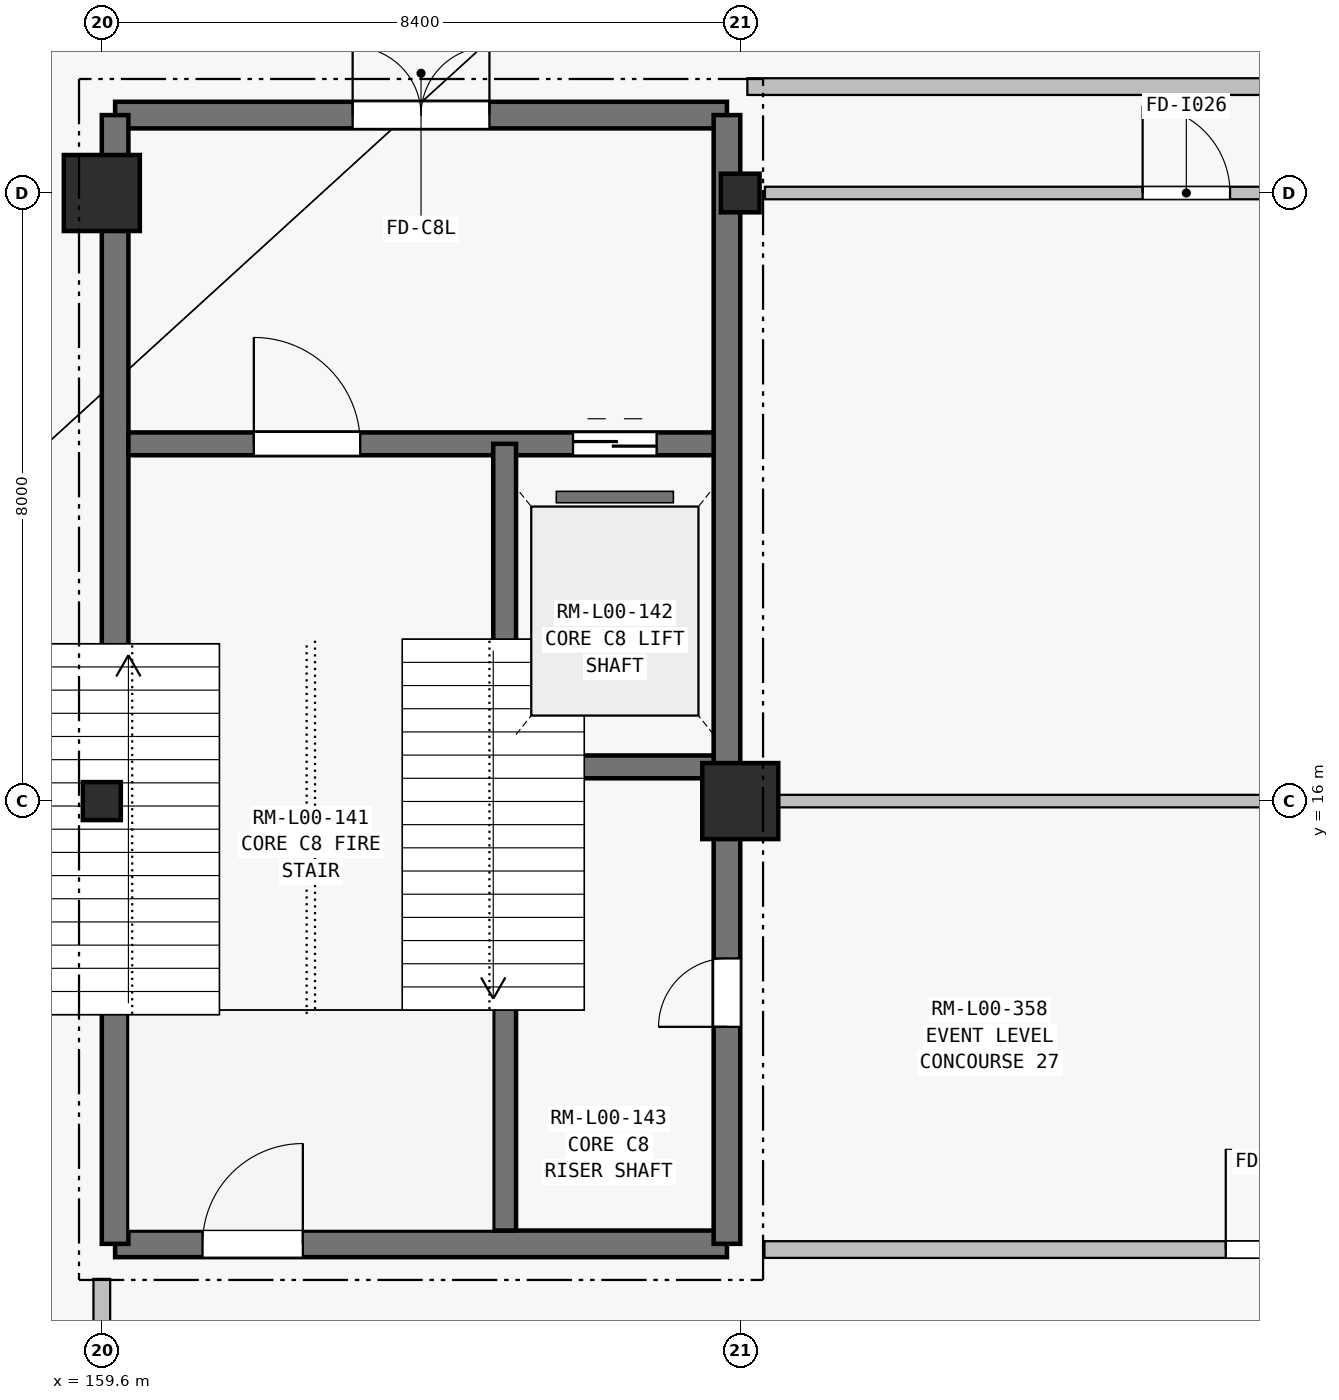
"""IFC4 building model, lengths in metres.
Left out: names, types, materials, properties, quantities, classifications, styles, units other than length and angle.
Written with IfcOpenShell. Run it as: python <this file> out.ifc"""

import sys

from ifc_helpers import new_model, si_unit, direction, frame, frame_2d, origin, origin_2d, place, context, subcontext, project, spatial, rectangle, hollow_circle, i_section, extrude, element, fill, save


model = new_model("IFC4")
c1 = context("Model", 3, precision=1e-05, world=origin(), true_north=direction((0.0, 1.0)))
c2 = subcontext(c1, "Body", "Model", "MODEL_VIEW")
j1 = project(units=[si_unit("LENGTHUNIT", "METRE"), si_unit("PLANEANGLEUNIT", "RADIAN")], contexts=[c1])
p1 = place(None, origin())
s1 = spatial("IfcSite", under=j1, at=p1, CompositionType="ELEMENT")
p2 = place(p1, origin())
s2 = spatial("IfcBuilding", under=s1, at=p2, CompositionType="ELEMENT")
p3 = place(p2, origin())
s3 = spatial("IfcBuildingStorey", under=s2, at=p3, CompositionType="ELEMENT", Elevation=0.0)
p4 = place(p3, frame((159.6, 16.0, 0.0), z_axis=(0.0, 0.0, 1.0), x_axis=(1.0, 0.0, 0.0)))
e1 = element("IfcColumn", 1, at=p4, inside=s3, PredefinedType="COLUMN", context=c2, shape_type="SweptSolid", body=[
    extrude(i_section(OverallWidth=0.5, OverallDepth=0.5, WebThickness=0.02, FlangeThickness=0.035, at=origin_2d()), origin(), (0.0, 0.0, 1.0), 5.4),
])
for number, where, z_axis, x_axis in (
    (2, (159.6, 24.0, 0.0), (0.0, 0.0, 1.0), (1.0, 0.0, 0.0)),
    (3, (168.0, 16.0, 0.0), (0.0, 0.0, 1.0), (1.0, 0.0, 0.0)),
):
    element("IfcColumn", number, at=place(p3, frame(where, z_axis=z_axis, x_axis=x_axis)), inside=s3, PredefinedType="COLUMN", context=c2, shape_type="SweptSolid", body=[
        extrude(rectangle(XDim=1.0, YDim=1.0, at=origin_2d()), origin(), (0.0, 0.0, 1.0), 5.4),
    ])
p5 = place(p3, frame((168.0, 24.0, 0.0), z_axis=(0.0, 0.0, 1.0), x_axis=(1.0, 0.0, 0.0)))
e4 = element("IfcColumn", 4, at=p5, inside=s3, PredefinedType="COLUMN", context=c2, shape_type="SweptSolid", body=[
    extrude(hollow_circle(Radius=0.254, WallThickness=0.016, at=origin_2d()), origin(), (0.0, 0.0, 1.0), 5.4),
])
p6 = place(p3, frame((159.775, 10.175, 0.0), z_axis=(0.0, 0.0, 1.0), x_axis=(1.0, 0.0, 0.0)))
e5 = element("IfcWall", 5, at=p6, inside=s3, PredefinedType="SHEAR", context=c2, shape_type="SweptSolid", body=[
    extrude(rectangle(XDim=8.05, YDim=0.35, at=frame_2d((4.025, 0.0))), origin(), (0.0, 0.0, 1.0), 5.4),
])
p7 = place(p6, frame((1.15, 0.0, 0.0)))
e6 = element("IfcOpeningElement", 6, at=p7, cuts=e5, PredefinedType="OPENING", context=c2, shape_type="SweptSolid", body=[
    extrude(rectangle(XDim=1.32, YDim=2.2, at=frame_2d((0.66, 1.1))), frame((0.0, 0.185, 0.0), z_axis=(0.0, -1.0, 0.0), x_axis=(1.0, 0.0, 0.0)), (0.0, 0.0, 1.0), 0.37),
])
p8 = place(p3, frame((159.775, 25.025, 0.0), z_axis=(0.0, 0.0, 1.0), x_axis=(1.0, 0.0, 0.0)))
e7 = element("IfcWall", 7, at=p8, inside=s3, PredefinedType="SHEAR", context=c2, shape_type="SweptSolid", body=[
    extrude(rectangle(XDim=8.05, YDim=0.35, at=frame_2d((4.025, 0.0))), origin(), (0.0, 0.0, 1.0), 5.4),
])
p9 = place(p8, frame((3.125, 0.0, 0.0)))
e8 = element("IfcOpeningElement", 8, at=p9, cuts=e7, PredefinedType="OPENING", context=c2, shape_type="SweptSolid", body=[
    extrude(rectangle(XDim=1.8, YDim=2.25, at=frame_2d((0.9, 1.125))), frame((0.0, 0.185, 0.0), z_axis=(0.0, -1.0, 0.0), x_axis=(1.0, 0.0, 0.0)), (0.0, 0.0, 1.0), 0.37),
])
p10 = place(p3, frame((159.775, 10.175, 0.0), z_axis=(0.0, 0.0, 1.0), x_axis=(0.0, 1.0, 0.0)))
e9 = element("IfcWall", 9, at=p10, inside=s3, PredefinedType="SHEAR", context=c2, shape_type="SweptSolid", body=[
    extrude(rectangle(XDim=14.85, YDim=0.35, at=frame_2d((7.425, 0.0))), origin(), (0.0, 0.0, 1.0), 5.4),
])
p11 = place(p3, frame((167.825, 10.175, 0.0), z_axis=(0.0, 0.0, 1.0), x_axis=(0.0, 1.0, 0.0)))
e10 = element("IfcWall", 10, at=p11, inside=s3, PredefinedType="SHEAR", context=c2, shape_type="SweptSolid", body=[
    extrude(rectangle(XDim=14.85, YDim=0.35, at=frame_2d((7.425, 0.0))), origin(), (0.0, 0.0, 1.0), 5.4),
])
p12 = place(p11, frame((2.855, 0.0, 0.0)))
e11 = element("IfcOpeningElement", 11, at=p12, cuts=e10, PredefinedType="OPENING", context=c2, shape_type="SweptSolid", body=[
    extrude(rectangle(XDim=0.9, YDim=2.1, at=frame_2d((0.45, 1.05))), frame((0.0, 0.185, 0.0), z_axis=(0.0, -1.0, 0.0), x_axis=(1.0, 0.0, 0.0)), (0.0, 0.0, 1.0), 0.37),
])
p13 = place(p3, frame((159.95, 20.7, 0.0), z_axis=(0.0, 0.0, 1.0), x_axis=(1.0, 0.0, 0.0)))
e12 = element("IfcWall", 12, at=p13, inside=s3, PredefinedType="SHEAR", context=c2, shape_type="SweptSolid", body=[
    extrude(rectangle(XDim=7.7, YDim=0.3, at=frame_2d((3.85, 0.0))), origin(), (0.0, 0.0, 1.0), 5.4),
])
p14 = place(p13, frame((1.65, 0.0, 0.0)))
e13 = element("IfcOpeningElement", 13, at=p14, cuts=e12, PredefinedType="OPENING", context=c2, shape_type="SweptSolid", body=[
    extrude(rectangle(XDim=1.4, YDim=2.2, at=frame_2d((0.7, 1.1))), frame((0.0, 0.16, 0.0), z_axis=(0.0, -1.0, 0.0), x_axis=(1.0, 0.0, 0.0)), (0.0, 0.0, 1.0), 0.32),
])
p15 = place(p13, frame((5.85, 0.0, 0.0)))
e14 = element("IfcOpeningElement", 14, at=p15, cuts=e12, PredefinedType="OPENING", context=c2, shape_type="SweptSolid", body=[
    extrude(rectangle(XDim=1.1, YDim=2.2, at=frame_2d((0.55, 1.1))), frame((0.0, 0.16, 0.0), z_axis=(0.0, -1.0, 0.0), x_axis=(1.0, 0.0, 0.0)), (0.0, 0.0, 1.0), 0.32),
])
p16 = place(p3, frame((164.9, 10.35, 0.0), z_axis=(0.0, 0.0, 1.0), x_axis=(0.0, 1.0, 0.0)))
e15 = element("IfcWall", 15, at=p16, inside=s3, PredefinedType="SHEAR", context=c2, shape_type="SweptSolid", body=[
    extrude(rectangle(XDim=10.35, YDim=0.3, at=frame_2d((5.175, 0.0))), origin(), (0.0, 0.0, 1.0), 5.4),
])
p17 = place(p3, frame((165.05, 16.45, 0.0), z_axis=(0.0, 0.0, 1.0), x_axis=(1.0, 0.0, 0.0)))
e16 = element("IfcWall", 16, at=p17, inside=s3, PredefinedType="SHEAR", context=c2, shape_type="SweptSolid", body=[
    extrude(rectangle(XDim=2.6, YDim=0.3, at=frame_2d((1.3, 0.0))), origin(), (0.0, 0.0, 1.0), 5.4),
])
p18 = place(p3, frame((159.6, 9.714, 0.0), z_axis=(0.0, 0.0, 1.0), x_axis=(0.0, -1.0, 0.0)))
e17 = element("IfcWall", 17, at=p18, inside=s3, PredefinedType="SOLIDWALL", context=c2, shape_type="SweptSolid", body=[
    extrude(rectangle(XDim=9.004, YDim=0.22, at=frame_2d((4.502, 0.0))), origin(), (0.0, 0.0, 1.0), 4.295),
])
p19 = place(p3, frame((117.886, 16.0, 0.0), z_axis=(0.0, 0.0, 1.0), x_axis=(1.0, 0.0, 0.0)))
e18 = element("IfcWall", 18, at=p19, inside=s3, PredefinedType="SOLIDWALL", context=c2, shape_type="SweptSolid", body=[
    extrude(rectangle(XDim=41.389, YDim=0.22, at=frame_2d((20.695, 0.0))), origin(), (0.0, 0.0, 1.0), 4.355),
])
p20 = place(p19, frame((19.745, 0.0, 0.0)))
e19 = element("IfcOpeningElement", 19, at=p20, cuts=e18, PredefinedType="OPENING", context=c2, shape_type="SweptSolid", body=[
    extrude(rectangle(XDim=1.9, YDim=2.35, at=frame_2d((0.95, 1.175))), frame((0.0, 0.12, 0.0), z_axis=(0.0, -1.0, 0.0), x_axis=(1.0, 0.0, 0.0)), (0.0, 0.0, 1.0), 0.24),
])
p21 = place(p3, frame((168.325, 24.0, 0.0), z_axis=(0.0, 0.0, 1.0), x_axis=(1.0, 0.0, 0.0)))
e20 = element("IfcWall", 20, at=p21, inside=s3, PredefinedType="PARTITIONING", context=c2, shape_type="SweptSolid", body=[
    extrude(rectangle(XDim=15.765, YDim=0.165, at=frame_2d((7.883, 0.0))), origin(), (0.0, 0.0, 1.0), 4.295),
])
p22 = place(p21, frame((4.969, 0.0, 0.0)))
e21 = element("IfcOpeningElement", 21, at=p22, cuts=e20, PredefinedType="OPENING", context=c2, shape_type="SweptSolid", body=[
    extrude(rectangle(XDim=1.15, YDim=2.2, at=frame_2d((0.575, 1.1))), frame((0.0, 0.093, 0.0), z_axis=(0.0, -1.0, 0.0), x_axis=(1.0, 0.0, 0.0)), (0.0, 0.0, 1.0), 0.185),
])
p23 = place(p3, frame((184.09, 16.0, 0.0), z_axis=(0.0, 0.0, 1.0), x_axis=(-1.0, 0.0, 0.0)))
e22 = element("IfcWall", 22, at=p23, inside=s3, PredefinedType="PARTITIONING", context=c2, shape_type="SweptSolid", body=[
    extrude(rectangle(XDim=15.765, YDim=0.165, at=frame_2d((7.883, 0.0))), origin(), (0.0, 0.0, 1.0), 4.295),
])
p24 = place(p3, frame((168.318, 10.1, 0.0), z_axis=(0.0, 0.0, 1.0), x_axis=(1.0, 0.0, 0.0)))
e23 = element("IfcWall", 23, at=p24, inside=s3, PredefinedType="SOLIDWALL", context=c2, shape_type="SweptSolid", body=[
    extrude(rectangle(XDim=15.772, YDim=0.22, at=frame_2d((7.886, 0.0))), origin(), (0.0, 0.0, 1.0), 4.483),
])
p25 = place(p24, frame((6.07, 0.0, 0.0)))
e24 = element("IfcOpeningElement", 24, at=p25, cuts=e23, PredefinedType="OPENING", context=c2, shape_type="SweptSolid", body=[
    extrude(rectangle(XDim=1.32, YDim=2.2, at=frame_2d((0.66, 1.1))), frame((0.0, 0.12, 0.0), z_axis=(0.0, -1.0, 0.0), x_axis=(1.0, 0.0, 0.0)), (0.0, 0.0, 1.0), 0.24),
])
p26 = place(p3, frame((184.09, 25.4, 0.0), z_axis=(0.0, 0.0, 1.0), x_axis=(-1.0, 0.0, 0.0)))
e25 = element("IfcWall", 25, at=p26, inside=s3, PredefinedType="SOLIDWALL", context=c2, shape_type="SweptSolid", body=[
    extrude(rectangle(XDim=15.997, YDim=0.22, at=frame_2d((7.999, 0.0))), origin(), (0.0, 0.0, 1.0), 4.483),
])
p27 = place(p9, origin())
e26 = element("IfcDoor", 26, at=p27, inside=s3, OperationType="DOUBLE_DOOR_SINGLE_SWING", PredefinedType="DOOR", context=c2, shape_type="SweptSolid", body=[
    extrude(rectangle(XDim=1.8, YDim=2.25, at=frame_2d((0.9, 1.125))), frame((0.0, 0.025, 0.0), z_axis=(0.0, -1.0, 0.0), x_axis=(1.0, 0.0, 0.0)), (0.0, 0.0, 1.0), 0.05),
])
fill(e8, e26)
p28 = place(p14, origin())
e27 = element("IfcDoor", 27, at=p28, inside=s3, OperationType="SINGLE_SWING_LEFT", PredefinedType="DOOR", context=c2, shape_type="SweptSolid", body=[
    extrude(rectangle(XDim=1.4, YDim=2.2, at=frame_2d((0.7, 1.1))), frame((0.0, 0.025, 0.0), z_axis=(0.0, -1.0, 0.0), x_axis=(1.0, 0.0, 0.0)), (0.0, 0.0, 1.0), 0.05),
])
fill(e13, e27)
p29 = place(p7, origin())
e28 = element("IfcDoor", 28, at=p29, inside=s3, OperationType="SINGLE_SWING_RIGHT", PredefinedType="DOOR", context=c2, shape_type="SweptSolid", body=[
    extrude(rectangle(XDim=1.32, YDim=2.2, at=frame_2d((0.66, 1.1))), frame((0.0, 0.025, 0.0), z_axis=(0.0, -1.0, 0.0), x_axis=(1.0, 0.0, 0.0)), (0.0, 0.0, 1.0), 0.05),
])
fill(e6, e28)
p30 = place(p12, origin())
e29 = element("IfcDoor", 29, at=p30, inside=s3, OperationType="SINGLE_SWING_LEFT", PredefinedType="DOOR", context=c2, shape_type="SweptSolid", body=[
    extrude(rectangle(XDim=0.9, YDim=2.1, at=frame_2d((0.45, 1.05))), frame((0.0, 0.025, 0.0), z_axis=(0.0, -1.0, 0.0), x_axis=(1.0, 0.0, 0.0)), (0.0, 0.0, 1.0), 0.05),
])
fill(e11, e29)
p31 = place(p15, origin())
e30 = element("IfcDoor", 30, at=p31, inside=s3, OperationType="SLIDING_TO_LEFT", PredefinedType="DOOR", context=c2, shape_type="SweptSolid", body=[
    extrude(rectangle(XDim=1.1, YDim=2.2, at=frame_2d((0.55, 1.1))), frame((0.0, 0.025, 0.0), z_axis=(0.0, -1.0, 0.0), x_axis=(1.0, 0.0, 0.0)), (0.0, 0.0, 1.0), 0.05),
])
fill(e14, e30)
p32 = place(p22, origin())
e31 = element("IfcDoor", 31, at=p32, inside=s3, OperationType="SINGLE_SWING_LEFT", PredefinedType="DOOR", context=c2, shape_type="SweptSolid", body=[
    extrude(rectangle(XDim=1.15, YDim=2.2, at=frame_2d((0.575, 1.1))), frame((0.0, 0.025, 0.0), z_axis=(0.0, -1.0, 0.0), x_axis=(1.0, 0.0, 0.0)), (0.0, 0.0, 1.0), 0.05),
])
fill(e21, e31)
p33 = place(p25, origin())
e32 = element("IfcDoor", 32, at=p33, inside=s3, OperationType="SINGLE_SWING_LEFT", PredefinedType="DOOR", context=c2, shape_type="SweptSolid", body=[
    extrude(rectangle(XDim=1.32, YDim=2.2, at=frame_2d((0.66, 1.1))), frame((0.0, 0.025, 0.0), z_axis=(0.0, -1.0, 0.0), x_axis=(1.0, 0.0, 0.0)), (0.0, 0.0, 1.0), 0.05),
])
fill(e24, e32)
save(model, sys.argv[1])
